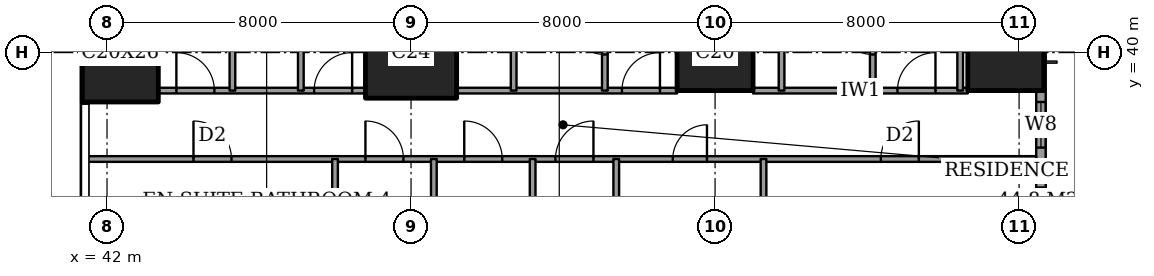
"""IFC4 building model, lengths in metres.
Left out: names, types, materials, properties, quantities, classifications, styles, units other than length and angle.
Written with IfcOpenShell. Run it as: python <this file> out.ifc"""

import sys

from ifc_helpers import new_model, si_unit, direction, frame, frame_2d, origin, origin_2d, place, context, subcontext, project, spatial, rectangle, extrude, element, fill, save


model = new_model("IFC4")
c1 = context("Model", 3, precision=1e-05, world=origin(), true_north=direction((0.0, 1.0)))
c2 = subcontext(c1, "Body", "Model", "MODEL_VIEW")
j1 = project(units=[si_unit("LENGTHUNIT", "METRE"), si_unit("PLANEANGLEUNIT", "RADIAN")], contexts=[c1])
p1 = place(None, origin())
s1 = spatial("IfcSite", under=j1, at=p1, CompositionType="ELEMENT")
p2 = place(p1, origin())
s2 = spatial("IfcBuilding", under=s1, at=p2, CompositionType="ELEMENT")
p3 = place(p2, frame((0.0, 0.0, 58.4)))
s3 = spatial("IfcBuildingStorey", under=s2, at=p3, CompositionType="ELEMENT", Elevation=58.4)
p4 = place(p3, frame((42.35, 40.0, 0.0), z_axis=(0.0, 0.0, 1.0), x_axis=(1.0, 0.0, 0.0)))
e1 = element("IfcColumn", 1, at=p4, inside=s3, PredefinedType="COLUMN", context=c2, shape_type="SweptSolid", body=[
    extrude(rectangle(XDim=2.0, YDim=2.6, at=origin_2d()), origin(), (0.0, 0.0, 1.0), 3.6),
])
p5 = place(p3, frame((50.0, 40.0, 0.0), z_axis=(0.0, 0.0, 1.0), x_axis=(1.0, 0.0, 0.0)))
e2 = element("IfcColumn", 2, at=p5, inside=s3, PredefinedType="COLUMN", context=c2, shape_type="SweptSolid", body=[
    extrude(rectangle(XDim=2.4, YDim=2.4, at=origin_2d()), origin(), (0.0, 0.0, 1.0), 3.6),
])
for number, where, z_axis, x_axis in (
    (3, (58.0, 40.0, 0.0), (0.0, 0.0, 1.0), (1.0, 0.0, 0.0)),
    (4, (65.65, 40.0, 0.0), (0.0, 0.0, 1.0), (1.0, 0.0, 0.0)),
):
    element("IfcColumn", number, at=place(p3, frame(where, z_axis=z_axis, x_axis=x_axis)), inside=s3, PredefinedType="COLUMN", context=c2, shape_type="SweptSolid", body=[
        extrude(rectangle(XDim=2.0, YDim=2.0, at=origin_2d()), origin(), (0.0, 0.0, 1.0), 3.6),
    ])
p6 = place(p3, frame((66.575, 3.175, 0.0), z_axis=(0.0, 0.0, 1.0), x_axis=(0.0, 1.0, 0.0)))
e5 = element("IfcWall", 5, at=p6, inside=s3, PredefinedType="SOLIDWALL", context=c2, shape_type="SweptSolid", body=[
    extrude(rectangle(XDim=41.65, YDim=0.25, at=frame_2d((20.825, 0.0))), origin(), (0.0, 0.0, 1.0), 3.6),
])
p7 = place(p6, frame((0.775, 0.0, 0.6)))
e6 = element("IfcOpeningElement", 6, at=p7, cuts=e5, PredefinedType="OPENING", context=c2, shape_type="SweptSolid", body=[
    extrude(rectangle(XDim=2.4, YDim=2.0, at=frame_2d((1.2, 1.0))), frame((0.0, 0.135, 0.0), z_axis=(0.0, -1.0, 0.0), x_axis=(1.0, 0.0, 0.0)), (0.0, 0.0, 1.0), 0.27),
])
p8 = place(p6, frame((6.1, 0.0, 0.6)))
e7 = element("IfcOpeningElement", 7, at=p8, cuts=e5, PredefinedType="OPENING", context=c2, shape_type="SweptSolid", body=[
    extrude(rectangle(XDim=1.2, YDim=2.0, at=frame_2d((0.6, 1.0))), frame((0.0, 0.135, 0.0), z_axis=(0.0, -1.0, 0.0), x_axis=(1.0, 0.0, 0.0)), (0.0, 0.0, 1.0), 0.27),
])
p9 = place(p6, frame((8.275, 0.0, 0.6)))
e8 = element("IfcOpeningElement", 8, at=p9, cuts=e5, PredefinedType="OPENING", context=c2, shape_type="SweptSolid", body=[
    extrude(rectangle(XDim=2.4, YDim=2.0, at=frame_2d((1.2, 1.0))), frame((0.0, 0.135, 0.0), z_axis=(0.0, -1.0, 0.0), x_axis=(1.0, 0.0, 0.0)), (0.0, 0.0, 1.0), 0.27),
])
p10 = place(p6, frame((15.775, 0.0, 0.6)))
e9 = element("IfcOpeningElement", 9, at=p10, cuts=e5, PredefinedType="OPENING", context=c2, shape_type="SweptSolid", body=[
    extrude(rectangle(XDim=2.4, YDim=2.0, at=frame_2d((1.2, 1.0))), frame((0.0, 0.135, 0.0), z_axis=(0.0, -1.0, 0.0), x_axis=(1.0, 0.0, 0.0)), (0.0, 0.0, 1.0), 0.27),
])
p11 = place(p6, frame((23.475, 0.0, 0.6)))
e10 = element("IfcOpeningElement", 10, at=p11, cuts=e5, PredefinedType="OPENING", context=c2, shape_type="SweptSolid", body=[
    extrude(rectangle(XDim=2.4, YDim=2.0, at=frame_2d((1.2, 1.0))), frame((0.0, 0.135, 0.0), z_axis=(0.0, -1.0, 0.0), x_axis=(1.0, 0.0, 0.0)), (0.0, 0.0, 1.0), 0.27),
])
p12 = place(p6, frame((30.875, 0.0, 0.6)))
e11 = element("IfcOpeningElement", 11, at=p12, cuts=e5, PredefinedType="OPENING", context=c2, shape_type="SweptSolid", body=[
    extrude(rectangle(XDim=2.4, YDim=2.0, at=frame_2d((1.2, 1.0))), frame((0.0, 0.135, 0.0), z_axis=(0.0, -1.0, 0.0), x_axis=(1.0, 0.0, 0.0)), (0.0, 0.0, 1.0), 0.27),
])
p13 = place(p6, frame((34.325, 0.0, 0.6)))
e12 = element("IfcOpeningElement", 12, at=p13, cuts=e5, PredefinedType="OPENING", context=c2, shape_type="SweptSolid", body=[
    extrude(rectangle(XDim=1.2, YDim=2.0, at=frame_2d((0.6, 1.0))), frame((0.0, 0.135, 0.0), z_axis=(0.0, -1.0, 0.0), x_axis=(1.0, 0.0, 0.0)), (0.0, 0.0, 1.0), 0.27),
])
p14 = place(p6, frame((38.475, 0.0, 0.6)))
e13 = element("IfcOpeningElement", 13, at=p14, cuts=e5, PredefinedType="OPENING", context=c2, shape_type="SweptSolid", body=[
    extrude(rectangle(XDim=2.4, YDim=2.0, at=frame_2d((1.2, 1.0))), frame((0.0, 0.135, 0.0), z_axis=(0.0, -1.0, 0.0), x_axis=(1.0, 0.0, 0.0)), (0.0, 0.0, 1.0), 0.27),
])
p15 = place(p3, frame((41.439, 37.2, 0.0), z_axis=(0.0, 0.0, 1.0), x_axis=(1.0, 0.0, 0.0)))
e14 = element("IfcWall", 14, at=p15, inside=s3, PredefinedType="PARTITIONING", context=c2, shape_type="SweptSolid", body=[
    extrude(rectangle(XDim=25.011, YDim=0.15, at=frame_2d((12.505, 0.0))), origin(), (0.0, 0.0, 1.0), 3.35),
])
p16 = place(p15, frame((12.361, 0.0, 0.0)))
e15 = element("IfcOpeningElement", 15, at=p16, cuts=e14, PredefinedType="OPENING", context=c2, shape_type="SweptSolid", body=[
    extrude(rectangle(XDim=1.0, YDim=2.1, at=frame_2d((0.5, 1.05))), frame((0.0, 0.085, 0.0), z_axis=(0.0, -1.0, 0.0), x_axis=(1.0, 0.0, 0.0)), (0.0, 0.0, 1.0), 0.17),
])
p17 = place(p15, frame((20.924, 0.0, 0.0)))
e16 = element("IfcOpeningElement", 16, at=p17, cuts=e14, PredefinedType="OPENING", context=c2, shape_type="SweptSolid", body=[
    extrude(rectangle(XDim=1.0, YDim=2.1, at=frame_2d((0.5, 1.05))), frame((0.0, 0.085, 0.0), z_axis=(0.0, -1.0, 0.0), x_axis=(1.0, 0.0, 0.0)), (0.0, 0.0, 1.0), 0.17),
])
p18 = place(p15, frame((15.448, 0.0, 0.0)))
e17 = element("IfcOpeningElement", 17, at=p18, cuts=e14, PredefinedType="OPENING", context=c2, shape_type="SweptSolid", body=[
    extrude(rectangle(XDim=0.9, YDim=2.1, at=frame_2d((0.45, 1.05))), frame((0.0, 0.085, 0.0), z_axis=(0.0, -1.0, 0.0), x_axis=(1.0, 0.0, 0.0)), (0.0, 0.0, 1.0), 0.17),
])
p19 = place(p15, frame((9.961, 0.0, 0.0)))
e18 = element("IfcOpeningElement", 18, at=p19, cuts=e14, PredefinedType="OPENING", context=c2, shape_type="SweptSolid", body=[
    extrude(rectangle(XDim=1.0, YDim=2.1, at=frame_2d((0.5, 1.05))), frame((0.0, 0.085, 0.0), z_axis=(0.0, -1.0, 0.0), x_axis=(1.0, 0.0, 0.0)), (0.0, 0.0, 1.0), 0.17),
])
p20 = place(p15, frame((7.361, 0.0, 0.0)))
e19 = element("IfcOpeningElement", 19, at=p20, cuts=e14, PredefinedType="OPENING", context=c2, shape_type="SweptSolid", body=[
    extrude(rectangle(XDim=1.0, YDim=2.1, at=frame_2d((0.5, 1.05))), frame((0.0, 0.085, 0.0), z_axis=(0.0, -1.0, 0.0), x_axis=(1.0, 0.0, 0.0)), (0.0, 0.0, 1.0), 0.17),
])
p21 = place(p15, frame((2.836, 0.0, 0.0)))
e20 = element("IfcOpeningElement", 20, at=p21, cuts=e14, PredefinedType="OPENING", context=c2, shape_type="SweptSolid", body=[
    extrude(rectangle(XDim=1.0, YDim=2.1, at=frame_2d((0.5, 1.05))), frame((0.0, 0.085, 0.0), z_axis=(0.0, -1.0, 0.0), x_axis=(1.0, 0.0, 0.0)), (0.0, 0.0, 1.0), 0.17),
])
p22 = place(p3, frame((43.35, 39.0, 0.0), z_axis=(0.0, 0.0, 1.0), x_axis=(1.0, 0.0, 0.0)))
e21 = element("IfcWall", 21, at=p22, inside=s3, PredefinedType="PARTITIONING", context=c2, shape_type="SweptSolid", body=[
    extrude(rectangle(XDim=5.45, YDim=0.15, at=frame_2d((2.725, 0.0))), origin(), (0.0, 0.0, 1.0), 3.35),
])
p23 = place(p22, frame((4.1, 0.0, 0.0)))
e22 = element("IfcOpeningElement", 22, at=p23, cuts=e21, PredefinedType="OPENING", context=c2, shape_type="SweptSolid", body=[
    extrude(rectangle(XDim=1.0, YDim=2.1, at=frame_2d((0.5, 1.05))), frame((0.0, 0.085, 0.0), z_axis=(0.0, -1.0, 0.0), x_axis=(1.0, 0.0, 0.0)), (0.0, 0.0, 1.0), 0.17),
])
p24 = place(p22, frame((0.475, 0.0, 0.0)))
e23 = element("IfcOpeningElement", 23, at=p24, cuts=e21, PredefinedType="OPENING", context=c2, shape_type="SweptSolid", body=[
    extrude(rectangle(XDim=1.0, YDim=2.1, at=frame_2d((0.5, 1.05))), frame((0.0, 0.085, 0.0), z_axis=(0.0, -1.0, 0.0), x_axis=(1.0, 0.0, 0.0)), (0.0, 0.0, 1.0), 0.17),
])
p25 = place(p3, frame((51.2, 39.0, 0.0), z_axis=(0.0, 0.0, 1.0), x_axis=(1.0, 0.0, 0.0)))
e24 = element("IfcWall", 24, at=p25, inside=s3, PredefinedType="PARTITIONING", context=c2, shape_type="SweptSolid", body=[
    extrude(rectangle(XDim=5.8, YDim=0.15, at=frame_2d((2.9, 0.0))), origin(), (0.0, 0.0, 1.0), 3.35),
])
p26 = place(p25, frame((4.35, 0.0, 0.0)))
e25 = element("IfcOpeningElement", 25, at=p26, cuts=e24, PredefinedType="OPENING", context=c2, shape_type="SweptSolid", body=[
    extrude(rectangle(XDim=1.0, YDim=2.1, at=frame_2d((0.5, 1.05))), frame((0.0, 0.085, 0.0), z_axis=(0.0, -1.0, 0.0), x_axis=(1.0, 0.0, 0.0)), (0.0, 0.0, 1.0), 0.17),
])
p27 = place(p3, frame((59.0, 39.0, 0.0), z_axis=(0.0, 0.0, 1.0), x_axis=(1.0, 0.0, 0.0)))
e26 = element("IfcWall", 26, at=p27, inside=s3, PredefinedType="PARTITIONING", context=c2, shape_type="SweptSolid", body=[
    extrude(rectangle(XDim=5.65, YDim=0.15, at=frame_2d((2.825, 0.0))), origin(), (0.0, 0.0, 1.0), 3.35),
])
p28 = place(p27, frame((3.8, 0.0, 0.0)))
e27 = element("IfcOpeningElement", 27, at=p28, cuts=e26, PredefinedType="OPENING", context=c2, shape_type="SweptSolid", body=[
    extrude(rectangle(XDim=1.0, YDim=2.1, at=frame_2d((0.5, 1.05))), frame((0.0, 0.085, 0.0), z_axis=(0.0, -1.0, 0.0), x_axis=(1.0, 0.0, 0.0)), (0.0, 0.0, 1.0), 0.17),
])
p29 = place(p3, frame((45.3, 39.0, 0.0), z_axis=(0.0, 0.0, 1.0), x_axis=(0.0, 1.0, 0.0)))
e28 = element("IfcWall", 28, at=p29, inside=s3, PredefinedType="PARTITIONING", context=c2, shape_type="SweptSolid", body=[
    extrude(rectangle(XDim=9.45, YDim=0.15, at=frame_2d((4.725, 0.0))), origin(), (0.0, 0.0, 1.0), 3.35),
])
p30 = place(p3, frame((47.1, 39.0, 0.0), z_axis=(0.0, 0.0, 1.0), x_axis=(0.0, 1.0, 0.0)))
e29 = element("IfcWall", 29, at=p30, inside=s3, PredefinedType="PARTITIONING", context=c2, shape_type="SweptSolid", body=[
    extrude(rectangle(XDim=3.8, YDim=0.15, at=frame_2d((1.9, 0.0))), origin(), (0.0, 0.0, 1.0), 3.35),
])
p31 = place(p30, frame((1.45, 0.0, 0.0)))
e30 = element("IfcOpeningElement", 30, at=p31, cuts=e29, PredefinedType="OPENING", context=c2, shape_type="SweptSolid", body=[
    extrude(rectangle(XDim=0.9, YDim=2.1, at=frame_2d((0.45, 1.05))), frame((0.0, 0.085, 0.0), z_axis=(0.0, -1.0, 0.0), x_axis=(1.0, 0.0, 0.0)), (0.0, 0.0, 1.0), 0.17),
])
p32 = place(p3, frame((48.0, 30.5, 0.0), z_axis=(0.0, 0.0, 1.0), x_axis=(0.0, 1.0, 0.0)))
e31 = element("IfcWall", 31, at=p32, inside=s3, PredefinedType="PARTITIONING", context=c2, shape_type="SweptSolid", body=[
    extrude(rectangle(XDim=6.7, YDim=0.15, at=frame_2d((3.35, 0.0))), origin(), (0.0, 0.0, 1.0), 3.35),
])
p33 = place(p3, frame((50.6, 33.2, 0.0), z_axis=(0.0, 0.0, 1.0), x_axis=(0.0, 1.0, 0.0)))
e32 = element("IfcWall", 32, at=p33, inside=s3, PredefinedType="PARTITIONING", context=c2, shape_type="SweptSolid", body=[
    extrude(rectangle(XDim=4.0, YDim=0.15, at=frame_2d((2.0, 0.0))), origin(), (0.0, 0.0, 1.0), 3.35),
])
p34 = place(p3, frame((52.7, 39.0, 0.0), z_axis=(0.0, 0.0, 1.0), x_axis=(0.0, 1.0, 0.0)))
e33 = element("IfcWall", 33, at=p34, inside=s3, PredefinedType="PARTITIONING", context=c2, shape_type="SweptSolid", body=[
    extrude(rectangle(XDim=9.45, YDim=0.15, at=frame_2d((4.725, 0.0))), origin(), (0.0, 0.0, 1.0), 3.35),
])
p35 = place(p34, frame((5.675, 0.0, 0.0)))
e34 = element("IfcOpeningElement", 34, at=p35, cuts=e33, PredefinedType="OPENING", context=c2, shape_type="SweptSolid", body=[
    extrude(rectangle(XDim=0.9, YDim=2.1, at=frame_2d((0.45, 1.05))), frame((0.0, 0.085, 0.0), z_axis=(0.0, -1.0, 0.0), x_axis=(1.0, 0.0, 0.0)), (0.0, 0.0, 1.0), 0.17),
])
p36 = place(p3, frame((53.2, 30.0, 0.0), z_axis=(0.0, 0.0, 1.0), x_axis=(0.0, 1.0, 0.0)))
e35 = element("IfcWall", 35, at=p36, inside=s3, PredefinedType="PARTITIONING", context=c2, shape_type="SweptSolid", body=[
    extrude(rectangle(XDim=7.2, YDim=0.15, at=frame_2d((3.6, 0.0))), origin(), (0.0, 0.0, 1.0), 3.35),
])
p37 = place(p3, frame((55.1, 39.0, 0.0), z_axis=(0.0, 0.0, 1.0), x_axis=(0.0, 1.0, 0.0)))
e36 = element("IfcWall", 36, at=p37, inside=s3, PredefinedType="PARTITIONING", context=c2, shape_type="SweptSolid", body=[
    extrude(rectangle(XDim=2.8, YDim=0.15, at=frame_2d((1.4, 0.0))), origin(), (0.0, 0.0, 1.0), 3.35),
])
p38 = place(p37, frame((0.95, 0.0, 0.0)))
e37 = element("IfcOpeningElement", 37, at=p38, cuts=e36, PredefinedType="OPENING", context=c2, shape_type="SweptSolid", body=[
    extrude(rectangle(XDim=0.9, YDim=2.1, at=frame_2d((0.45, 1.05))), frame((0.0, 0.085, 0.0), z_axis=(0.0, -1.0, 0.0), x_axis=(1.0, 0.0, 0.0)), (0.0, 0.0, 1.0), 0.17),
])
p39 = place(p3, frame((55.4, 28.0, 0.0), z_axis=(0.0, 0.0, 1.0), x_axis=(0.0, 1.0, 0.0)))
e38 = element("IfcWall", 38, at=p39, inside=s3, PredefinedType="PARTITIONING", context=c2, shape_type="SweptSolid", body=[
    extrude(rectangle(XDim=9.2, YDim=0.15, at=frame_2d((4.6, 0.0))), origin(), (0.0, 0.0, 1.0), 3.35),
])
p40 = place(p39, frame((0.5, 0.0, 0.0)))
e39 = element("IfcOpeningElement", 39, at=p40, cuts=e38, PredefinedType="OPENING", context=c2, shape_type="SweptSolid", body=[
    extrude(rectangle(XDim=1.0, YDim=2.1, at=frame_2d((0.5, 1.05))), frame((0.0, 0.085, 0.0), z_axis=(0.0, -1.0, 0.0), x_axis=(1.0, 0.0, 0.0)), (0.0, 0.0, 1.0), 0.17),
])
p41 = place(p3, frame((59.275, 33.2, 0.0), z_axis=(0.0, 0.0, 1.0), x_axis=(0.0, 1.0, 0.0)))
e40 = element("IfcWall", 40, at=p41, inside=s3, PredefinedType="PARTITIONING", context=c2, shape_type="SweptSolid", body=[
    extrude(rectangle(XDim=4.0, YDim=0.15, at=frame_2d((2.0, 0.0))), origin(), (0.0, 0.0, 1.0), 3.35),
])
p42 = place(p3, frame((59.75, 39.0, 0.0), z_axis=(0.0, 0.0, 1.0), x_axis=(0.0, 1.0, 0.0)))
e41 = element("IfcWall", 41, at=p42, inside=s3, PredefinedType="PARTITIONING", context=c2, shape_type="SweptSolid", body=[
    extrude(rectangle(XDim=9.45, YDim=0.15, at=frame_2d((4.725, 0.0))), origin(), (0.0, 0.0, 1.0), 3.35),
])
p43 = place(p42, frame((5.675, 0.0, 0.0)))
e42 = element("IfcOpeningElement", 42, at=p43, cuts=e41, PredefinedType="OPENING", context=c2, shape_type="SweptSolid", body=[
    extrude(rectangle(XDim=0.9, YDim=2.1, at=frame_2d((0.45, 1.05))), frame((0.0, 0.085, 0.0), z_axis=(0.0, -1.0, 0.0), x_axis=(1.0, 0.0, 0.0)), (0.0, 0.0, 1.0), 0.17),
])
p44 = place(p3, frame((62.15, 39.0, 0.0), z_axis=(0.0, 0.0, 1.0), x_axis=(0.0, 1.0, 0.0)))
e43 = element("IfcWall", 43, at=p44, inside=s3, PredefinedType="PARTITIONING", context=c2, shape_type="SweptSolid", body=[
    extrude(rectangle(XDim=2.8, YDim=0.15, at=frame_2d((1.4, 0.0))), origin(), (0.0, 0.0, 1.0), 3.35),
])
p45 = place(p44, frame((0.95, 0.0, 0.0)))
e44 = element("IfcOpeningElement", 44, at=p45, cuts=e43, PredefinedType="OPENING", context=c2, shape_type="SweptSolid", body=[
    extrude(rectangle(XDim=0.9, YDim=2.1, at=frame_2d((0.45, 1.05))), frame((0.0, 0.085, 0.0), z_axis=(0.0, -1.0, 0.0), x_axis=(1.0, 0.0, 0.0)), (0.0, 0.0, 1.0), 0.17),
])
p46 = place(p3, frame((64.45, 39.0, 0.0), z_axis=(0.0, 0.0, 1.0), x_axis=(0.0, 1.0, 0.0)))
e45 = element("IfcWall", 45, at=p46, inside=s3, PredefinedType="PARTITIONING", context=c2, shape_type="SweptSolid", body=[
    extrude(rectangle(XDim=5.7, YDim=0.15, at=frame_2d((2.85, 0.0))), origin(), (0.0, 0.0, 1.0), 3.35),
])
p47 = place(p46, frame((2.4, 0.0, 0.0)))
e46 = element("IfcOpeningElement", 46, at=p47, cuts=e45, PredefinedType="OPENING", context=c2, shape_type="SweptSolid", body=[
    extrude(rectangle(XDim=0.9, YDim=2.1, at=frame_2d((0.45, 1.05))), frame((0.0, 0.085, 0.0), z_axis=(0.0, -1.0, 0.0), x_axis=(1.0, 0.0, 0.0)), (0.0, 0.0, 1.0), 0.17),
])
p48 = place(p12, origin())
e47 = element("IfcWindow", 47, at=p48, inside=s3, PartitioningType="SINGLE_PANEL", PredefinedType="WINDOW", context=c2, shape_type="SweptSolid", body=[
    extrude(rectangle(XDim=2.4, YDim=2.0, at=frame_2d((1.2, 1.0))), frame((0.0, 0.03, 0.0), z_axis=(0.0, -1.0, 0.0), x_axis=(1.0, 0.0, 0.0)), (0.0, 0.0, 1.0), 0.06),
])
fill(e11, e47)
p49 = place(p13, origin())
e48 = element("IfcWindow", 48, at=p49, inside=s3, PartitioningType="SINGLE_PANEL", PredefinedType="WINDOW", context=c2, shape_type="SweptSolid", body=[
    extrude(rectangle(XDim=1.2, YDim=2.0, at=frame_2d((0.6, 1.0))), frame((0.0, 0.03, 0.0), z_axis=(0.0, -1.0, 0.0), x_axis=(1.0, 0.0, 0.0)), (0.0, 0.0, 1.0), 0.06),
])
fill(e12, e48)
p50 = place(p45, origin())
e49 = element("IfcDoor", 49, at=p50, inside=s3, OperationType="SINGLE_SWING_LEFT", PredefinedType="DOOR", context=c2, shape_type="SweptSolid", body=[
    extrude(rectangle(XDim=0.9, YDim=2.1, at=frame_2d((0.45, 1.05))), frame((0.0, 0.025, 0.0), z_axis=(0.0, -1.0, 0.0), x_axis=(1.0, 0.0, 0.0)), (0.0, 0.0, 1.0), 0.05),
])
fill(e44, e49)
p51 = place(p28, origin())
e50 = element("IfcDoor", 50, at=p51, inside=s3, OperationType="SINGLE_SWING_LEFT", PredefinedType="DOOR", context=c2, shape_type="SweptSolid", body=[
    extrude(rectangle(XDim=1.0, YDim=2.1, at=frame_2d((0.5, 1.05))), frame((0.0, 0.025, 0.0), z_axis=(0.0, -1.0, 0.0), x_axis=(1.0, 0.0, 0.0)), (0.0, 0.0, 1.0), 0.05),
])
fill(e27, e50)
p52 = place(p38, origin())
e51 = element("IfcDoor", 51, at=p52, inside=s3, OperationType="SINGLE_SWING_LEFT", PredefinedType="DOOR", context=c2, shape_type="SweptSolid", body=[
    extrude(rectangle(XDim=0.9, YDim=2.1, at=frame_2d((0.45, 1.05))), frame((0.0, 0.025, 0.0), z_axis=(0.0, -1.0, 0.0), x_axis=(1.0, 0.0, 0.0)), (0.0, 0.0, 1.0), 0.05),
])
fill(e37, e51)
p53 = place(p26, origin())
e52 = element("IfcDoor", 52, at=p53, inside=s3, OperationType="SINGLE_SWING_LEFT", PredefinedType="DOOR", context=c2, shape_type="SweptSolid", body=[
    extrude(rectangle(XDim=1.0, YDim=2.1, at=frame_2d((0.5, 1.05))), frame((0.0, 0.025, 0.0), z_axis=(0.0, -1.0, 0.0), x_axis=(1.0, 0.0, 0.0)), (0.0, 0.0, 1.0), 0.05),
])
fill(e25, e52)
p54 = place(p23, origin())
e53 = element("IfcDoor", 53, at=p54, inside=s3, OperationType="SINGLE_SWING_LEFT", PredefinedType="DOOR", context=c2, shape_type="SweptSolid", body=[
    extrude(rectangle(XDim=1.0, YDim=2.1, at=frame_2d((0.5, 1.05))), frame((0.0, 0.025, 0.0), z_axis=(0.0, -1.0, 0.0), x_axis=(1.0, 0.0, 0.0)), (0.0, 0.0, 1.0), 0.05),
])
fill(e22, e53)
p55 = place(p24, origin())
e54 = element("IfcDoor", 54, at=p55, inside=s3, OperationType="SINGLE_SWING_RIGHT", PredefinedType="DOOR", context=c2, shape_type="SweptSolid", body=[
    extrude(rectangle(XDim=1.0, YDim=2.1, at=frame_2d((0.5, 1.05))), frame((0.0, 0.025, 0.0), z_axis=(0.0, -1.0, 0.0), x_axis=(1.0, 0.0, 0.0)), (0.0, 0.0, 1.0), 0.05),
])
fill(e23, e54)
p56 = place(p16, origin())
e55 = element("IfcDoor", 55, at=p56, inside=s3, OperationType="SINGLE_SWING_LEFT", PredefinedType="DOOR", context=c2, shape_type="SweptSolid", body=[
    extrude(rectangle(XDim=1.0, YDim=2.1, at=frame_2d((0.5, 1.05))), frame((0.0, 0.025, 0.0), z_axis=(0.0, -1.0, 0.0), x_axis=(1.0, 0.0, 0.0)), (0.0, 0.0, 1.0), 0.05),
])
fill(e15, e55)
p57 = place(p17, origin())
e56 = element("IfcDoor", 56, at=p57, inside=s3, OperationType="SINGLE_SWING_LEFT", PredefinedType="DOOR", context=c2, shape_type="SweptSolid", body=[
    extrude(rectangle(XDim=1.0, YDim=2.1, at=frame_2d((0.5, 1.05))), frame((0.0, 0.025, 0.0), z_axis=(0.0, -1.0, 0.0), x_axis=(1.0, 0.0, 0.0)), (0.0, 0.0, 1.0), 0.05),
])
fill(e16, e56)
p58 = place(p18, origin())
e57 = element("IfcDoor", 57, at=p58, inside=s3, OperationType="SINGLE_SWING_LEFT", PredefinedType="DOOR", context=c2, shape_type="SweptSolid", body=[
    extrude(rectangle(XDim=0.9, YDim=2.1, at=frame_2d((0.45, 1.05))), frame((0.0, 0.025, 0.0), z_axis=(0.0, -1.0, 0.0), x_axis=(1.0, 0.0, 0.0)), (0.0, 0.0, 1.0), 0.05),
])
fill(e17, e57)
p59 = place(p19, origin())
e58 = element("IfcDoor", 58, at=p59, inside=s3, OperationType="SINGLE_SWING_RIGHT", PredefinedType="DOOR", context=c2, shape_type="SweptSolid", body=[
    extrude(rectangle(XDim=1.0, YDim=2.1, at=frame_2d((0.5, 1.05))), frame((0.0, 0.025, 0.0), z_axis=(0.0, -1.0, 0.0), x_axis=(1.0, 0.0, 0.0)), (0.0, 0.0, 1.0), 0.05),
])
fill(e18, e58)
p60 = place(p20, origin())
e59 = element("IfcDoor", 59, at=p60, inside=s3, OperationType="SINGLE_SWING_RIGHT", PredefinedType="DOOR", context=c2, shape_type="SweptSolid", body=[
    extrude(rectangle(XDim=1.0, YDim=2.1, at=frame_2d((0.5, 1.05))), frame((0.0, 0.025, 0.0), z_axis=(0.0, -1.0, 0.0), x_axis=(1.0, 0.0, 0.0)), (0.0, 0.0, 1.0), 0.05),
])
fill(e19, e59)
p61 = place(p21, origin())
e60 = element("IfcDoor", 60, at=p61, inside=s3, OperationType="SINGLE_SWING_RIGHT", PredefinedType="DOOR", context=c2, shape_type="SweptSolid", body=[
    extrude(rectangle(XDim=1.0, YDim=2.1, at=frame_2d((0.5, 1.05))), frame((0.0, 0.025, 0.0), z_axis=(0.0, -1.0, 0.0), x_axis=(1.0, 0.0, 0.0)), (0.0, 0.0, 1.0), 0.05),
])
fill(e20, e60)
save(model, sys.argv[1])
